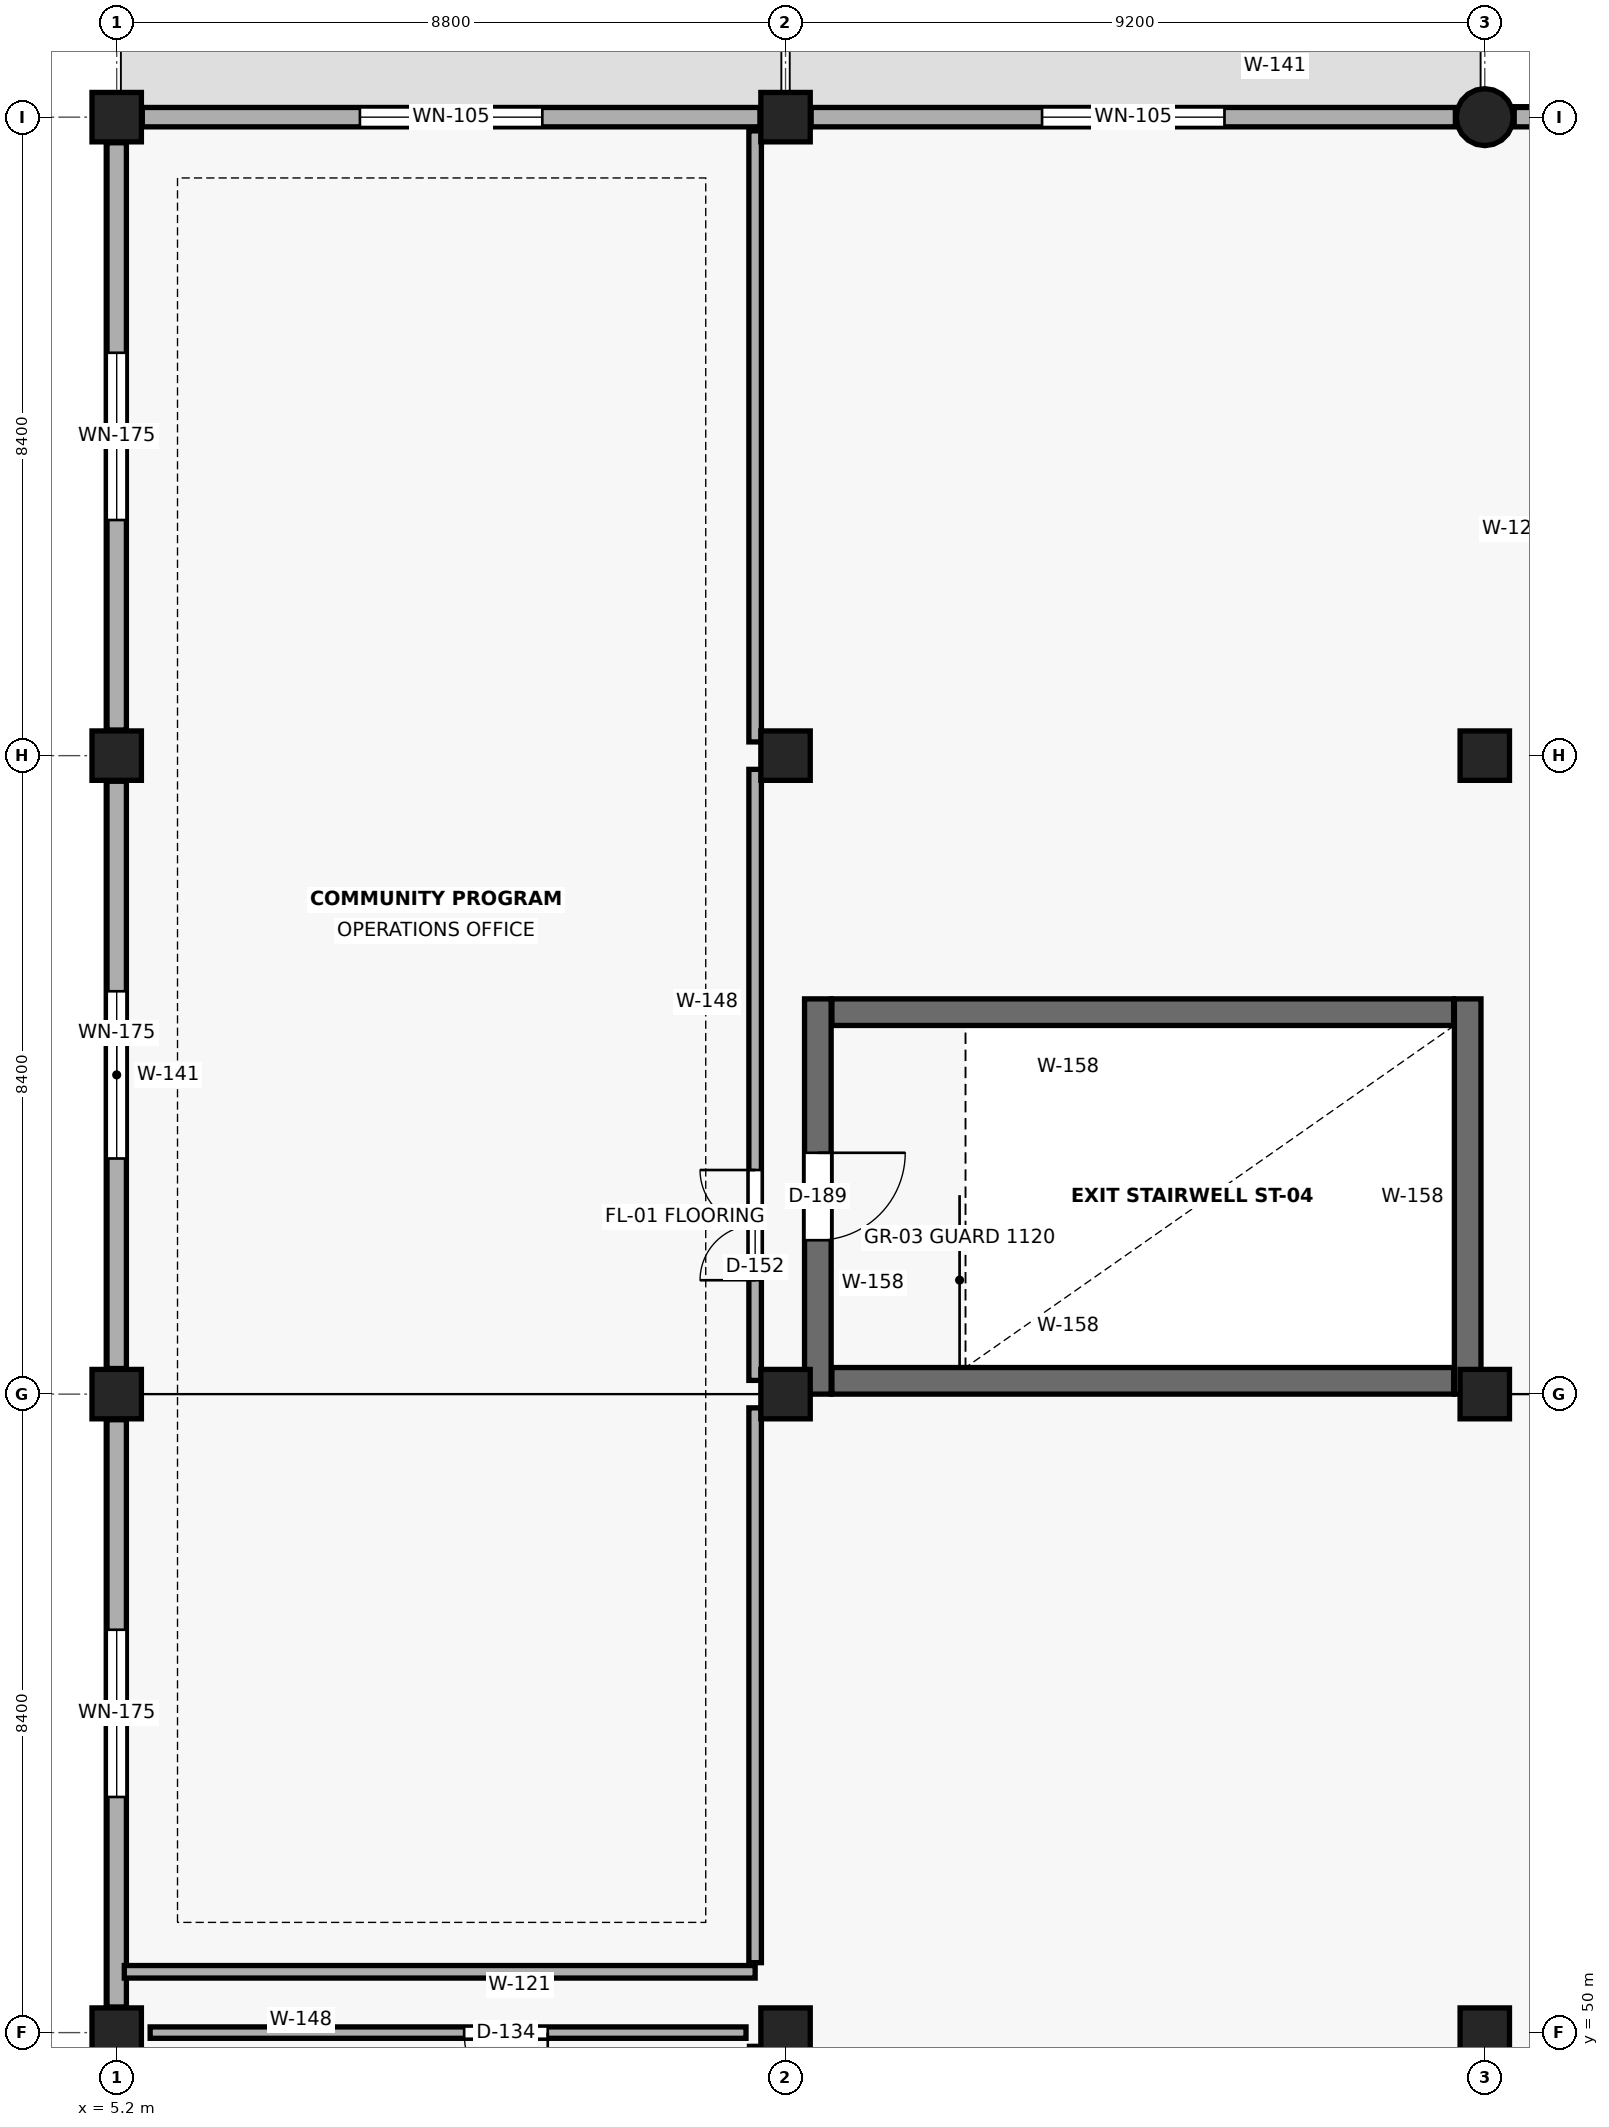
"""IFC4 building model, lengths in metres.
Left out: names, types, materials, properties, quantities, classifications, styles, units other than length and angle.
Written with IfcOpenShell. Run it as: python <this file> out.ifc"""

import sys

from ifc_helpers import new_model, si_unit, direction, frame, frame_2d, origin, origin_2d, place, context, subcontext, project, spatial, rectangle, circle, extrude, element, fill, save


model = new_model("IFC4")
c1 = context("Model", 3, precision=1e-05, world=origin(), true_north=direction((0.0, 1.0)))
c2 = subcontext(c1, "Body", "Model", "MODEL_VIEW")
j1 = project(units=[si_unit("LENGTHUNIT", "METRE"), si_unit("PLANEANGLEUNIT", "RADIAN")], contexts=[c1])
p1 = place(None, origin())
s1 = spatial("IfcSite", under=j1, at=p1, CompositionType="ELEMENT")
p2 = place(p1, origin())
s2 = spatial("IfcBuilding", under=s1, at=p2, CompositionType="ELEMENT")
p3 = place(p2, frame((0.0, 0.0, 5.1)))
s3 = spatial("IfcBuildingStorey", under=s2, at=p3, CompositionType="ELEMENT", Elevation=5.1)
for number, where, z_axis, x_axis in (
    (1, (5.2, 50.0, 0.0), (0.0, 0.0, 1.0), (1.0, 0.0, 0.0)),
    (2, (5.2, 58.4, 0.0), (0.0, 0.0, 1.0), (1.0, 0.0, 0.0)),
    (3, (5.2, 66.8, 0.0), (0.0, 0.0, 1.0), (1.0, 0.0, 0.0)),
    (4, (5.2, 75.2, 0.0), (0.0, 0.0, 1.0), (1.0, 0.0, 0.0)),
    (5, (14.0, 50.0, 0.0), (0.0, 0.0, 1.0), (1.0, 0.0, 0.0)),
    (6, (14.0, 58.4, 0.0), (0.0, 0.0, 1.0), (1.0, 0.0, 0.0)),
    (7, (14.0, 66.8, 0.0), (0.0, 0.0, 1.0), (1.0, 0.0, 0.0)),
    (8, (14.0, 75.2, 0.0), (0.0, 0.0, 1.0), (1.0, 0.0, 0.0)),
    (9, (23.2, 50.0, 0.0), (0.0, 0.0, 1.0), (1.0, 0.0, 0.0)),
    (10, (23.2, 58.4, 0.0), (0.0, 0.0, 1.0), (1.0, 0.0, 0.0)),
    (11, (23.2, 66.8, 0.0), (0.0, 0.0, 1.0), (1.0, 0.0, 0.0)),
):
    element("IfcColumn", number, at=place(p3, frame(where, z_axis=z_axis, x_axis=x_axis)), inside=s3, PredefinedType="COLUMN", context=c2, shape_type="SweptSolid", body=[
        extrude(rectangle(XDim=0.65, YDim=0.65, at=origin_2d()), origin(), (0.0, 0.0, 1.0), 4.8),
    ])
p4 = place(p3, frame((23.2, 75.2, 0.0), z_axis=(0.0, 0.0, 1.0), x_axis=(1.0, 0.0, 0.0)))
e12 = element("IfcColumn", 12, at=p4, inside=s3, PredefinedType="COLUMN", context=c2, shape_type="SweptSolid", body=[
    extrude(circle(Radius=0.375, at=origin_2d()), origin(), (0.0, 0.0, 1.0), 4.8),
])
p5 = place(p3, frame((5.537, 75.2, 0.0), z_axis=(0.0, 0.0, 1.0), x_axis=(1.0, 0.0, 0.0)))
e13 = element("IfcWall", 13, at=p5, inside=s3, PredefinedType="SOLIDWALL", context=c2, shape_type="SweptSolid", body=[
    extrude(rectangle(XDim=8.126, YDim=0.255, at=frame_2d((4.063, 0.0))), origin(), (0.0, 0.0, 1.0), 3.61),
])
p6 = place(p5, frame((2.863, 0.0, 0.85)))
e14 = element("IfcOpeningElement", 14, at=p6, cuts=e13, PredefinedType="OPENING", context=c2, shape_type="SweptSolid", body=[
    extrude(rectangle(XDim=2.4, YDim=2.4, at=frame_2d((1.2, 1.2))), frame((0.0, 0.139, 0.0), z_axis=(0.0, -1.0, 0.0), x_axis=(1.0, 0.0, 0.0)), (0.0, 0.0, 1.0), 0.279),
])
p7 = place(p3, frame((14.337, 75.2, 0.0), z_axis=(0.0, 0.0, 1.0), x_axis=(1.0, 0.0, 0.0)))
e15 = element("IfcWall", 15, at=p7, inside=s3, PredefinedType="SOLIDWALL", context=c2, shape_type="SweptSolid", body=[
    extrude(rectangle(XDim=8.476, YDim=0.255, at=frame_2d((4.238, 0.0))), origin(), (0.0, 0.0, 1.0), 3.61),
])
p8 = place(p7, frame((3.038, 0.0, 0.85)))
e16 = element("IfcOpeningElement", 16, at=p8, cuts=e15, PredefinedType="OPENING", context=c2, shape_type="SweptSolid", body=[
    extrude(rectangle(XDim=2.4, YDim=2.4, at=frame_2d((1.2, 1.2))), frame((0.0, 0.139, 0.0), z_axis=(0.0, -1.0, 0.0), x_axis=(1.0, 0.0, 0.0)), (0.0, 0.0, 1.0), 0.279),
])
p9 = place(p3, frame((23.587, 75.2, 0.0), z_axis=(0.0, 0.0, 1.0), x_axis=(1.0, 0.0, 0.0)))
e17 = element("IfcWall", 17, at=p9, inside=s3, PredefinedType="SOLIDWALL", context=c2, shape_type="SweptSolid", body=[
    extrude(rectangle(XDim=8.476, YDim=0.255, at=frame_2d((4.238, 0.0))), origin(), (0.0, 0.0, 1.0), 3.61),
])
p10 = place(p9, frame((3.038, 0.0, 0.85)))
e18 = element("IfcOpeningElement", 18, at=p10, cuts=e17, PredefinedType="OPENING", context=c2, shape_type="SweptSolid", body=[
    extrude(rectangle(XDim=2.4, YDim=2.4, at=frame_2d((1.2, 1.2))), frame((0.0, 0.139, 0.0), z_axis=(0.0, -1.0, 0.0), x_axis=(1.0, 0.0, 0.0)), (0.0, 0.0, 1.0), 0.279),
])
p11 = place(p3, frame((5.2, 50.337, 0.0), z_axis=(0.0, 0.0, 1.0), x_axis=(0.0, 1.0, 0.0)))
e19 = element("IfcWall", 19, at=p11, inside=s3, PredefinedType="SOLIDWALL", context=c2, shape_type="SweptSolid", body=[
    extrude(rectangle(XDim=7.726, YDim=0.255, at=frame_2d((3.863, 0.0))), origin(), (0.0, 0.0, 1.0), 3.61),
])
p12 = place(p11, frame((2.763, 0.0, 0.85)))
e20 = element("IfcOpeningElement", 20, at=p12, cuts=e19, PredefinedType="OPENING", context=c2, shape_type="SweptSolid", body=[
    extrude(rectangle(XDim=2.2, YDim=2.3, at=frame_2d((1.1, 1.15))), frame((0.0, 0.139, 0.0), z_axis=(0.0, -1.0, 0.0), x_axis=(1.0, 0.0, 0.0)), (0.0, 0.0, 1.0), 0.279),
])
p13 = place(p3, frame((5.2, 58.737, 0.0), z_axis=(0.0, 0.0, 1.0), x_axis=(0.0, 1.0, 0.0)))
e21 = element("IfcWall", 21, at=p13, inside=s3, PredefinedType="SOLIDWALL", context=c2, shape_type="SweptSolid", body=[
    extrude(rectangle(XDim=7.726, YDim=0.255, at=frame_2d((3.863, 0.0))), origin(), (0.0, 0.0, 1.0), 3.61),
])
p14 = place(p13, frame((2.763, 0.0, 0.85)))
e22 = element("IfcOpeningElement", 22, at=p14, cuts=e21, PredefinedType="OPENING", context=c2, shape_type="SweptSolid", body=[
    extrude(rectangle(XDim=2.2, YDim=2.3, at=frame_2d((1.1, 1.15))), frame((0.0, 0.139, 0.0), z_axis=(0.0, -1.0, 0.0), x_axis=(1.0, 0.0, 0.0)), (0.0, 0.0, 1.0), 0.279),
])
p15 = place(p3, frame((5.2, 67.137, 0.0), z_axis=(0.0, 0.0, 1.0), x_axis=(0.0, 1.0, 0.0)))
e23 = element("IfcWall", 23, at=p15, inside=s3, PredefinedType="SOLIDWALL", context=c2, shape_type="SweptSolid", body=[
    extrude(rectangle(XDim=7.726, YDim=0.255, at=frame_2d((3.863, 0.0))), origin(), (0.0, 0.0, 1.0), 3.61),
])
p16 = place(p15, frame((2.763, 0.0, 0.85)))
e24 = element("IfcOpeningElement", 24, at=p16, cuts=e23, PredefinedType="OPENING", context=c2, shape_type="SweptSolid", body=[
    extrude(rectangle(XDim=2.2, YDim=2.3, at=frame_2d((1.1, 1.15))), frame((0.0, 0.139, 0.0), z_axis=(0.0, -1.0, 0.0), x_axis=(1.0, 0.0, 0.0)), (0.0, 0.0, 1.0), 0.279),
])
p17 = place(p3, frame((14.425, 63.6, 0.0), z_axis=(0.0, 0.0, 1.0), x_axis=(0.0, -1.0, 0.0)))
e25 = element("IfcWall", 25, at=p17, inside=s3, PredefinedType="SHEAR", context=c2, shape_type="SweptSolid", body=[
    extrude(rectangle(XDim=5.2, YDim=0.35, at=frame_2d((2.6, 0.0))), origin(), (0.0, 0.0, 1.0), 4.47),
])
p18 = place(p17, frame((2.025, 0.0, 0.0)))
e26 = element("IfcOpeningElement", 26, at=p18, cuts=e25, PredefinedType="OPENING", context=c2, shape_type="SweptSolid", body=[
    extrude(rectangle(XDim=1.15, YDim=2.2, at=frame_2d((0.575, 1.1))), frame((0.0, 0.187, 0.0), z_axis=(0.0, -1.0, 0.0), x_axis=(1.0, 0.0, 0.0)), (0.0, 0.0, 1.0), 0.374),
])
p19 = place(p3, frame((22.975, 58.4, 0.0), z_axis=(0.0, 0.0, 1.0), x_axis=(0.0, 1.0, 0.0)))
e27 = element("IfcWall", 27, at=p19, inside=s3, PredefinedType="SHEAR", context=c2, shape_type="SweptSolid", body=[
    extrude(rectangle(XDim=5.2, YDim=0.35, at=frame_2d((2.6, 0.0))), origin(), (0.0, 0.0, 1.0), 4.47),
])
for number, where, z_axis, x_axis in (
    (28, (14.61, 58.575, 0.0), (0.0, 0.0, 1.0), (1.0, 0.0, 0.0)),
    (29, (22.79, 63.425, 0.0), (0.0, 0.0, 1.0), (-1.0, 0.0, 0.0)),
):
    element("IfcWall", number, at=place(p3, frame(where, z_axis=z_axis, x_axis=x_axis)), inside=s3, PredefinedType="SHEAR", context=c2, shape_type="SweptSolid", body=[
        extrude(rectangle(XDim=8.18, YDim=0.35, at=frame_2d((4.09, 0.0))), origin(), (0.0, 0.0, 1.0), 4.47),
    ])
p20 = place(p3, frame((13.6, 41.381, 0.0), z_axis=(0.0, 0.0, 1.0), x_axis=(0.0, 1.0, 0.0)))
e30 = element("IfcWall", 30, at=p20, inside=s3, PredefinedType="PARTITIONING", context=c2, shape_type="SweptSolid", body=[
    extrude(rectangle(XDim=8.439, YDim=0.15, at=frame_2d((4.219, 0.0))), origin(), (0.0, 0.0, 1.0), 4.47),
])
p21 = place(p3, frame((13.48, 50.0, 0.0), z_axis=(0.0, 0.0, 1.0), x_axis=(-1.0, 0.0, 0.0)))
e31 = element("IfcWall", 31, at=p21, inside=s3, PredefinedType="PARTITIONING", context=c2, shape_type="SweptSolid", body=[
    extrude(rectangle(XDim=7.84, YDim=0.15, at=frame_2d((3.92, 0.0))), origin(), (0.0, 0.0, 1.0), 4.157),
])
p22 = place(p21, frame((2.609, 0.0, 0.0)))
e32 = element("IfcOpeningElement", 32, at=p22, cuts=e31, PredefinedType="OPENING", context=c2, shape_type="SweptSolid", body=[
    extrude(rectangle(XDim=1.1, YDim=2.25, at=frame_2d((0.55, 1.125))), frame((0.0, 0.087, 0.0), z_axis=(0.0, -1.0, 0.0), x_axis=(1.0, 0.0, 0.0)), (0.0, 0.0, 1.0), 0.174),
])
p23 = place(p3, frame((5.3, 50.8, 0.0), z_axis=(0.0, 0.0, 1.0), x_axis=(1.0, 0.0, 0.0)))
e33 = element("IfcWall", 33, at=p23, inside=s3, PredefinedType="PARTITIONING", context=c2, shape_type="SweptSolid", body=[
    extrude(rectangle(XDim=8.3, YDim=0.165, at=frame_2d((4.15, 0.0))), origin(), (0.0, 0.0, 1.0), 4.47),
])
p24 = place(p3, frame((13.6, 50.92, 0.0), z_axis=(0.0, 0.0, 1.0), x_axis=(0.0, 1.0, 0.0)))
e34 = element("IfcWall", 34, at=p24, inside=s3, PredefinedType="PARTITIONING", context=c2, shape_type="SweptSolid", body=[
    extrude(rectangle(XDim=7.3, YDim=0.165, at=frame_2d((3.65, 0.0))), origin(), (0.0, 0.0, 1.0), 4.47),
])
p25 = place(p3, frame((13.6, 58.581, 0.0), z_axis=(0.0, 0.0, 1.0), x_axis=(0.0, 1.0, 0.0)))
e35 = element("IfcWall", 35, at=p25, inside=s3, PredefinedType="PARTITIONING", context=c2, shape_type="SweptSolid", body=[
    extrude(rectangle(XDim=8.039, YDim=0.165, at=frame_2d((4.02, 0.0))), origin(), (0.0, 0.0, 1.0), 4.47),
])
p26 = place(p25, frame((1.318, 0.0, 0.0)))
e36 = element("IfcOpeningElement", 36, at=p26, cuts=e35, PredefinedType="OPENING", context=c2, shape_type="SweptSolid", body=[
    extrude(rectangle(XDim=1.45, YDim=2.35, at=frame_2d((0.725, 1.175))), frame((0.0, 0.094, 0.0), z_axis=(0.0, -1.0, 0.0), x_axis=(1.0, 0.0, 0.0)), (0.0, 0.0, 1.0), 0.189),
])
p27 = place(p3, frame((13.6, 66.98, 0.0), z_axis=(0.0, 0.0, 1.0), x_axis=(0.0, 1.0, 0.0)))
e37 = element("IfcWall", 37, at=p27, inside=s3, PredefinedType="PARTITIONING", context=c2, shape_type="SweptSolid", body=[
    extrude(rectangle(XDim=8.039, YDim=0.165, at=frame_2d((4.02, 0.0))), origin(), (0.0, 0.0, 1.0), 4.47),
])
p28 = place(p6, origin())
e38 = element("IfcWindow", 38, at=p28, inside=s3, PartitioningType="SINGLE_PANEL", PredefinedType="WINDOW", context=c2, shape_type="SweptSolid", body=[
    extrude(rectangle(XDim=2.4, YDim=2.4, at=frame_2d((1.2, 1.2))), frame((0.0, 0.03, 0.0), z_axis=(0.0, -1.0, 0.0), x_axis=(1.0, 0.0, 0.0)), (0.0, 0.0, 1.0), 0.06),
])
fill(e14, e38)
p29 = place(p8, origin())
e39 = element("IfcWindow", 39, at=p29, inside=s3, PartitioningType="SINGLE_PANEL", PredefinedType="WINDOW", context=c2, shape_type="SweptSolid", body=[
    extrude(rectangle(XDim=2.4, YDim=2.4, at=frame_2d((1.2, 1.2))), frame((0.0, 0.03, 0.0), z_axis=(0.0, -1.0, 0.0), x_axis=(1.0, 0.0, 0.0)), (0.0, 0.0, 1.0), 0.06),
])
fill(e16, e39)
p30 = place(p12, origin())
e40 = element("IfcWindow", 40, at=p30, inside=s3, PartitioningType="SINGLE_PANEL", PredefinedType="WINDOW", context=c2, shape_type="SweptSolid", body=[
    extrude(rectangle(XDim=2.2, YDim=2.3, at=frame_2d((1.1, 1.15))), frame((0.0, 0.03, 0.0), z_axis=(0.0, -1.0, 0.0), x_axis=(1.0, 0.0, 0.0)), (0.0, 0.0, 1.0), 0.06),
])
fill(e20, e40)
p31 = place(p14, origin())
e41 = element("IfcWindow", 41, at=p31, inside=s3, PartitioningType="SINGLE_PANEL", PredefinedType="WINDOW", context=c2, shape_type="SweptSolid", body=[
    extrude(rectangle(XDim=2.2, YDim=2.3, at=frame_2d((1.1, 1.15))), frame((0.0, 0.03, 0.0), z_axis=(0.0, -1.0, 0.0), x_axis=(1.0, 0.0, 0.0)), (0.0, 0.0, 1.0), 0.06),
])
fill(e22, e41)
p32 = place(p16, origin())
e42 = element("IfcWindow", 42, at=p32, inside=s3, PartitioningType="SINGLE_PANEL", PredefinedType="WINDOW", context=c2, shape_type="SweptSolid", body=[
    extrude(rectangle(XDim=2.2, YDim=2.3, at=frame_2d((1.1, 1.15))), frame((0.0, 0.03, 0.0), z_axis=(0.0, -1.0, 0.0), x_axis=(1.0, 0.0, 0.0)), (0.0, 0.0, 1.0), 0.06),
])
fill(e24, e42)
p33 = place(p18, origin())
e43 = element("IfcDoor", 43, at=p33, inside=s3, OperationType="SINGLE_SWING_LEFT", PredefinedType="DOOR", context=c2, shape_type="SweptSolid", body=[
    extrude(rectangle(XDim=1.15, YDim=2.2, at=frame_2d((0.575, 1.1))), frame((0.0, 0.025, 0.0), z_axis=(0.0, -1.0, 0.0), x_axis=(1.0, 0.0, 0.0)), (0.0, 0.0, 1.0), 0.05),
])
fill(e26, e43)
p34 = place(p22, origin())
e44 = element("IfcDoor", 44, at=p34, inside=s3, OperationType="SINGLE_SWING_LEFT", PredefinedType="DOOR", context=c2, shape_type="SweptSolid", body=[
    extrude(rectangle(XDim=1.1, YDim=2.25, at=frame_2d((0.55, 1.125))), frame((0.0, 0.025, 0.0), z_axis=(0.0, -1.0, 0.0), x_axis=(1.0, 0.0, 0.0)), (0.0, 0.0, 1.0), 0.05),
])
fill(e32, e44)
p35 = place(p26, origin())
e45 = element("IfcDoor", 45, at=p35, inside=s3, OperationType="DOUBLE_DOOR_SINGLE_SWING", PredefinedType="DOOR", context=c2, shape_type="SweptSolid", body=[
    extrude(rectangle(XDim=1.45, YDim=2.35, at=frame_2d((0.725, 1.175))), frame((0.0, 0.025, 0.0), z_axis=(0.0, -1.0, 0.0), x_axis=(1.0, 0.0, 0.0)), (0.0, 0.0, 1.0), 0.05),
])
fill(e36, e45)
save(model, sys.argv[1])
